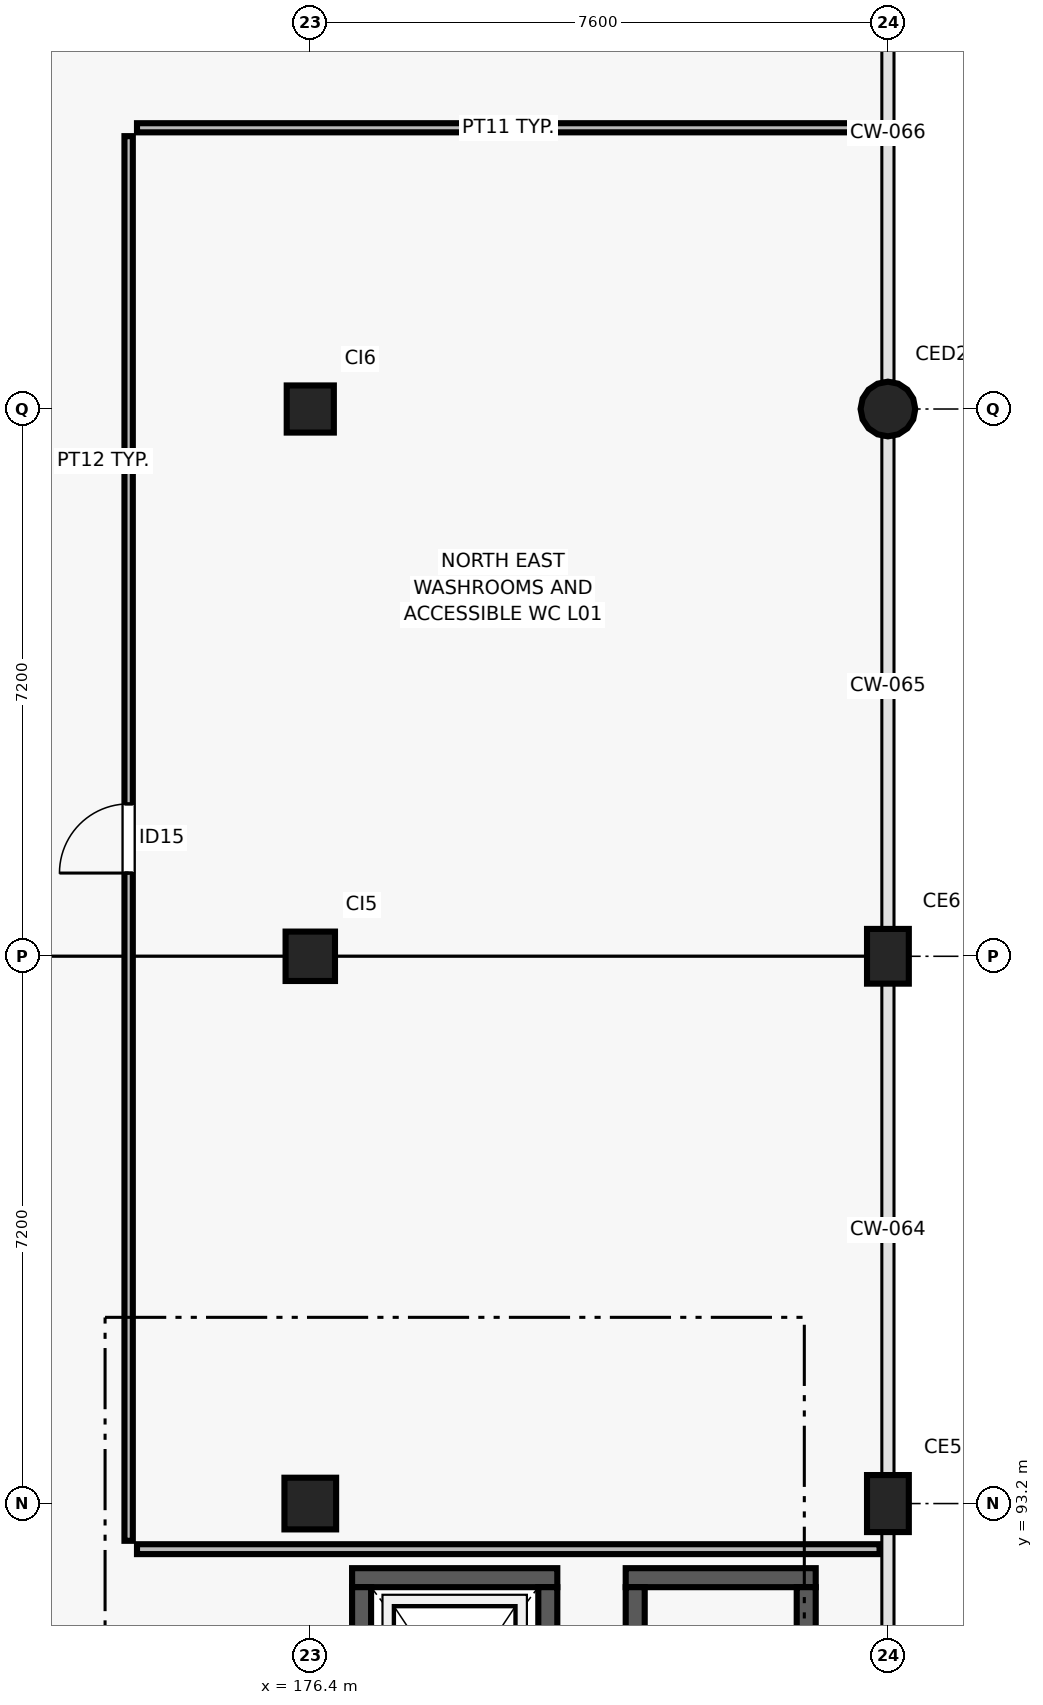
"""IFC4 building model, lengths in metres.
Left out: names, types, materials, properties, quantities, classifications, styles, units other than length and angle.
Written with IfcOpenShell. Run it as: python <this file> out.ifc"""

import sys

from ifc_helpers import new_model, si_unit, direction, frame, frame_2d, origin, origin_2d, place, context, subcontext, project, spatial, rectangle, circle, extrude, element, fill, save


model = new_model("IFC4")
c1 = context("Model", 3, precision=1e-05, world=origin(), true_north=direction((0.0, 1.0)))
c2 = subcontext(c1, "Body", "Model", "MODEL_VIEW")
j1 = project(units=[si_unit("LENGTHUNIT", "METRE"), si_unit("PLANEANGLEUNIT", "RADIAN")], contexts=[c1])
p1 = place(None, origin())
s1 = spatial("IfcSite", under=j1, at=p1, CompositionType="ELEMENT")
p2 = place(p1, origin())
s2 = spatial("IfcBuilding", under=s1, at=p2, CompositionType="ELEMENT")
p3 = place(p2, frame((0.0, 0.0, 4.5)))
s3 = spatial("IfcBuildingStorey", under=s2, at=p3, CompositionType="ELEMENT", Elevation=4.5)
p4 = place(p3, frame((176.4, 93.2, 0.0), z_axis=(0.0, 0.0, 1.0), x_axis=(1.0, 0.0, 0.0)))
e1 = element("IfcColumn", 1, at=p4, inside=s3, PredefinedType="COLUMN", context=c2, shape_type="SweptSolid", body=[
    extrude(rectangle(XDim=0.68, YDim=0.68, at=origin_2d()), origin(), (0.0, 0.0, 1.0), 4.5),
])
p5 = place(p3, frame((176.4, 100.4, 0.0), z_axis=(0.0, 0.0, 1.0), x_axis=(1.0, 0.0, 0.0)))
e2 = element("IfcColumn", 2, at=p5, inside=s3, PredefinedType="COLUMN", context=c2, shape_type="SweptSolid", body=[
    extrude(rectangle(XDim=0.65, YDim=0.65, at=origin_2d()), origin(), (0.0, 0.0, 1.0), 4.5),
])
p6 = place(p3, frame((176.4, 107.6, 0.0), z_axis=(0.0, 0.0, 1.0), x_axis=(1.0, 0.0, 0.0)))
e3 = element("IfcColumn", 3, at=p6, inside=s3, PredefinedType="COLUMN", context=c2, shape_type="SweptSolid", body=[
    extrude(rectangle(XDim=0.62, YDim=0.62, at=origin_2d()), origin(), (0.0, 0.0, 1.0), 4.5),
])
p7 = place(p3, frame((184.0, 93.2, 0.0), z_axis=(0.0, 0.0, 1.0), x_axis=(1.0, 0.0, 0.0)))
e4 = element("IfcColumn", 4, at=p7, inside=s3, PredefinedType="COLUMN", context=c2, shape_type="SweptSolid", body=[
    extrude(rectangle(XDim=0.75, YDim=0.55, at=origin_2d()), origin(), (0.0, 0.0, 1.0), 4.5),
])
p8 = place(p3, frame((184.0, 100.4, 0.0), z_axis=(0.0, 0.0, 1.0), x_axis=(1.0, 0.0, 0.0)))
e5 = element("IfcColumn", 5, at=p8, inside=s3, PredefinedType="COLUMN", context=c2, shape_type="SweptSolid", body=[
    extrude(rectangle(XDim=0.72, YDim=0.55, at=origin_2d()), origin(), (0.0, 0.0, 1.0), 4.5),
])
p9 = place(p3, frame((184.0, 107.6, 0.0), z_axis=(0.0, 0.0, 1.0), x_axis=(1.0, 0.0, 0.0)))
e6 = element("IfcColumn", 6, at=p9, inside=s3, PredefinedType="COLUMN", context=c2, shape_type="SweptSolid", body=[
    extrude(circle(Radius=0.36, at=origin_2d()), origin(), (0.0, 0.0, 1.0), 4.5),
])
p10 = place(p3, frame((176.95, 92.225, 0.0), z_axis=(0.0, 0.0, 1.0), x_axis=(1.0, 0.0, 0.0)))
e7 = element("IfcWall", 7, at=p10, inside=s3, PredefinedType="SHEAR", context=c2, shape_type="SweptSolid", body=[
    extrude(rectangle(XDim=2.7, YDim=0.25, at=frame_2d((1.35, 0.0))), origin(), (0.0, 0.0, 1.0), 4.22),
])
for number, where, z_axis, x_axis in (
    (8, (177.075, 89.2, 0.0), (0.0, 0.0, 1.0), (0.0, 1.0, 0.0)),
    (9, (179.525, 89.2, 0.0), (0.0, 0.0, 1.0), (0.0, 1.0, 0.0)),
):
    element("IfcWall", number, at=place(p3, frame(where, z_axis=z_axis, x_axis=x_axis)), inside=s3, PredefinedType="SHEAR", context=c2, shape_type="SweptSolid", body=[
        extrude(rectangle(XDim=2.9, YDim=0.25, at=frame_2d((1.45, 0.0))), origin(), (0.0, 0.0, 1.0), 4.22),
    ])
p11 = place(p3, frame((180.55, 92.225, 0.0), z_axis=(0.0, 0.0, 1.0), x_axis=(1.0, 0.0, 0.0)))
e10 = element("IfcWall", 10, at=p11, inside=s3, PredefinedType="SHEAR", context=c2, shape_type="SweptSolid", body=[
    extrude(rectangle(XDim=2.5, YDim=0.25, at=frame_2d((1.25, 0.0))), origin(), (0.0, 0.0, 1.0), 4.22),
])
for number, where, z_axis, x_axis in (
    (11, (180.675, 89.2, 0.0), (0.0, 0.0, 1.0), (0.0, 1.0, 0.0)),
    (12, (182.925, 89.2, 0.0), (0.0, 0.0, 1.0), (0.0, 1.0, 0.0)),
):
    element("IfcWall", number, at=place(p3, frame(where, z_axis=z_axis, x_axis=x_axis)), inside=s3, PredefinedType="SHEAR", context=c2, shape_type="SweptSolid", body=[
        extrude(rectangle(XDim=2.9, YDim=0.25, at=frame_2d((1.45, 0.0))), origin(), (0.0, 0.0, 1.0), 4.22),
    ])
p12 = place(p3, frame((174.12, 92.6, 0.0), z_axis=(0.0, 0.0, 1.0), x_axis=(1.0, 0.0, 0.0)))
e13 = element("IfcWall", 13, at=p12, inside=s3, PredefinedType="PARTITIONING", context=c2, shape_type="SweptSolid", body=[
    extrude(rectangle(XDim=9.77, YDim=0.13, at=frame_2d((4.885, 0.0))), origin(), (0.0, 0.0, 1.0), 4.2),
])
p13 = place(p3, frame((174.12, 111.3, 0.0), z_axis=(0.0, 0.0, 1.0), x_axis=(1.0, 0.0, 0.0)))
e14 = element("IfcWall", 14, at=p13, inside=s3, PredefinedType="PARTITIONING", context=c2, shape_type="SweptSolid", body=[
    extrude(rectangle(XDim=9.77, YDim=0.12, at=frame_2d((4.885, 0.0))), origin(), (0.0, 0.0, 1.0), 3.78),
])
p14 = place(p3, frame((174.01, 92.71, 0.0), z_axis=(0.0, 0.0, 1.0), x_axis=(0.0, 1.0, 0.0)))
e15 = element("IfcWall", 15, at=p14, inside=s3, PredefinedType="PARTITIONING", context=c2, shape_type="SweptSolid", body=[
    extrude(rectangle(XDim=18.48, YDim=0.11, at=frame_2d((9.24, 0.0))), origin(), (0.0, 0.0, 1.0), 4.2),
])
p15 = place(p14, frame((8.785, 0.0, 0.0)))
e16 = element("IfcOpeningElement", 16, at=p15, cuts=e15, PredefinedType="OPENING", context=c2, shape_type="SweptSolid", body=[
    extrude(rectangle(XDim=0.91, YDim=2.1, at=frame_2d((0.455, 1.05))), frame((0.0, 0.065, 0.0), z_axis=(0.0, -1.0, 0.0), x_axis=(1.0, 0.0, 0.0)), (0.0, 0.0, 1.0), 0.13),
])
p16 = place(p15, origin())
e17 = element("IfcDoor", 17, at=p16, inside=s3, OperationType="SINGLE_SWING_LEFT", PredefinedType="DOOR", context=c2, shape_type="SweptSolid", body=[
    extrude(rectangle(XDim=0.91, YDim=2.1, at=frame_2d((0.455, 1.05))), frame((0.0, 0.025, 0.0), z_axis=(0.0, -1.0, 0.0), x_axis=(1.0, 0.0, 0.0)), (0.0, 0.0, 1.0), 0.05),
])
fill(e16, e17)
save(model, sys.argv[1])
